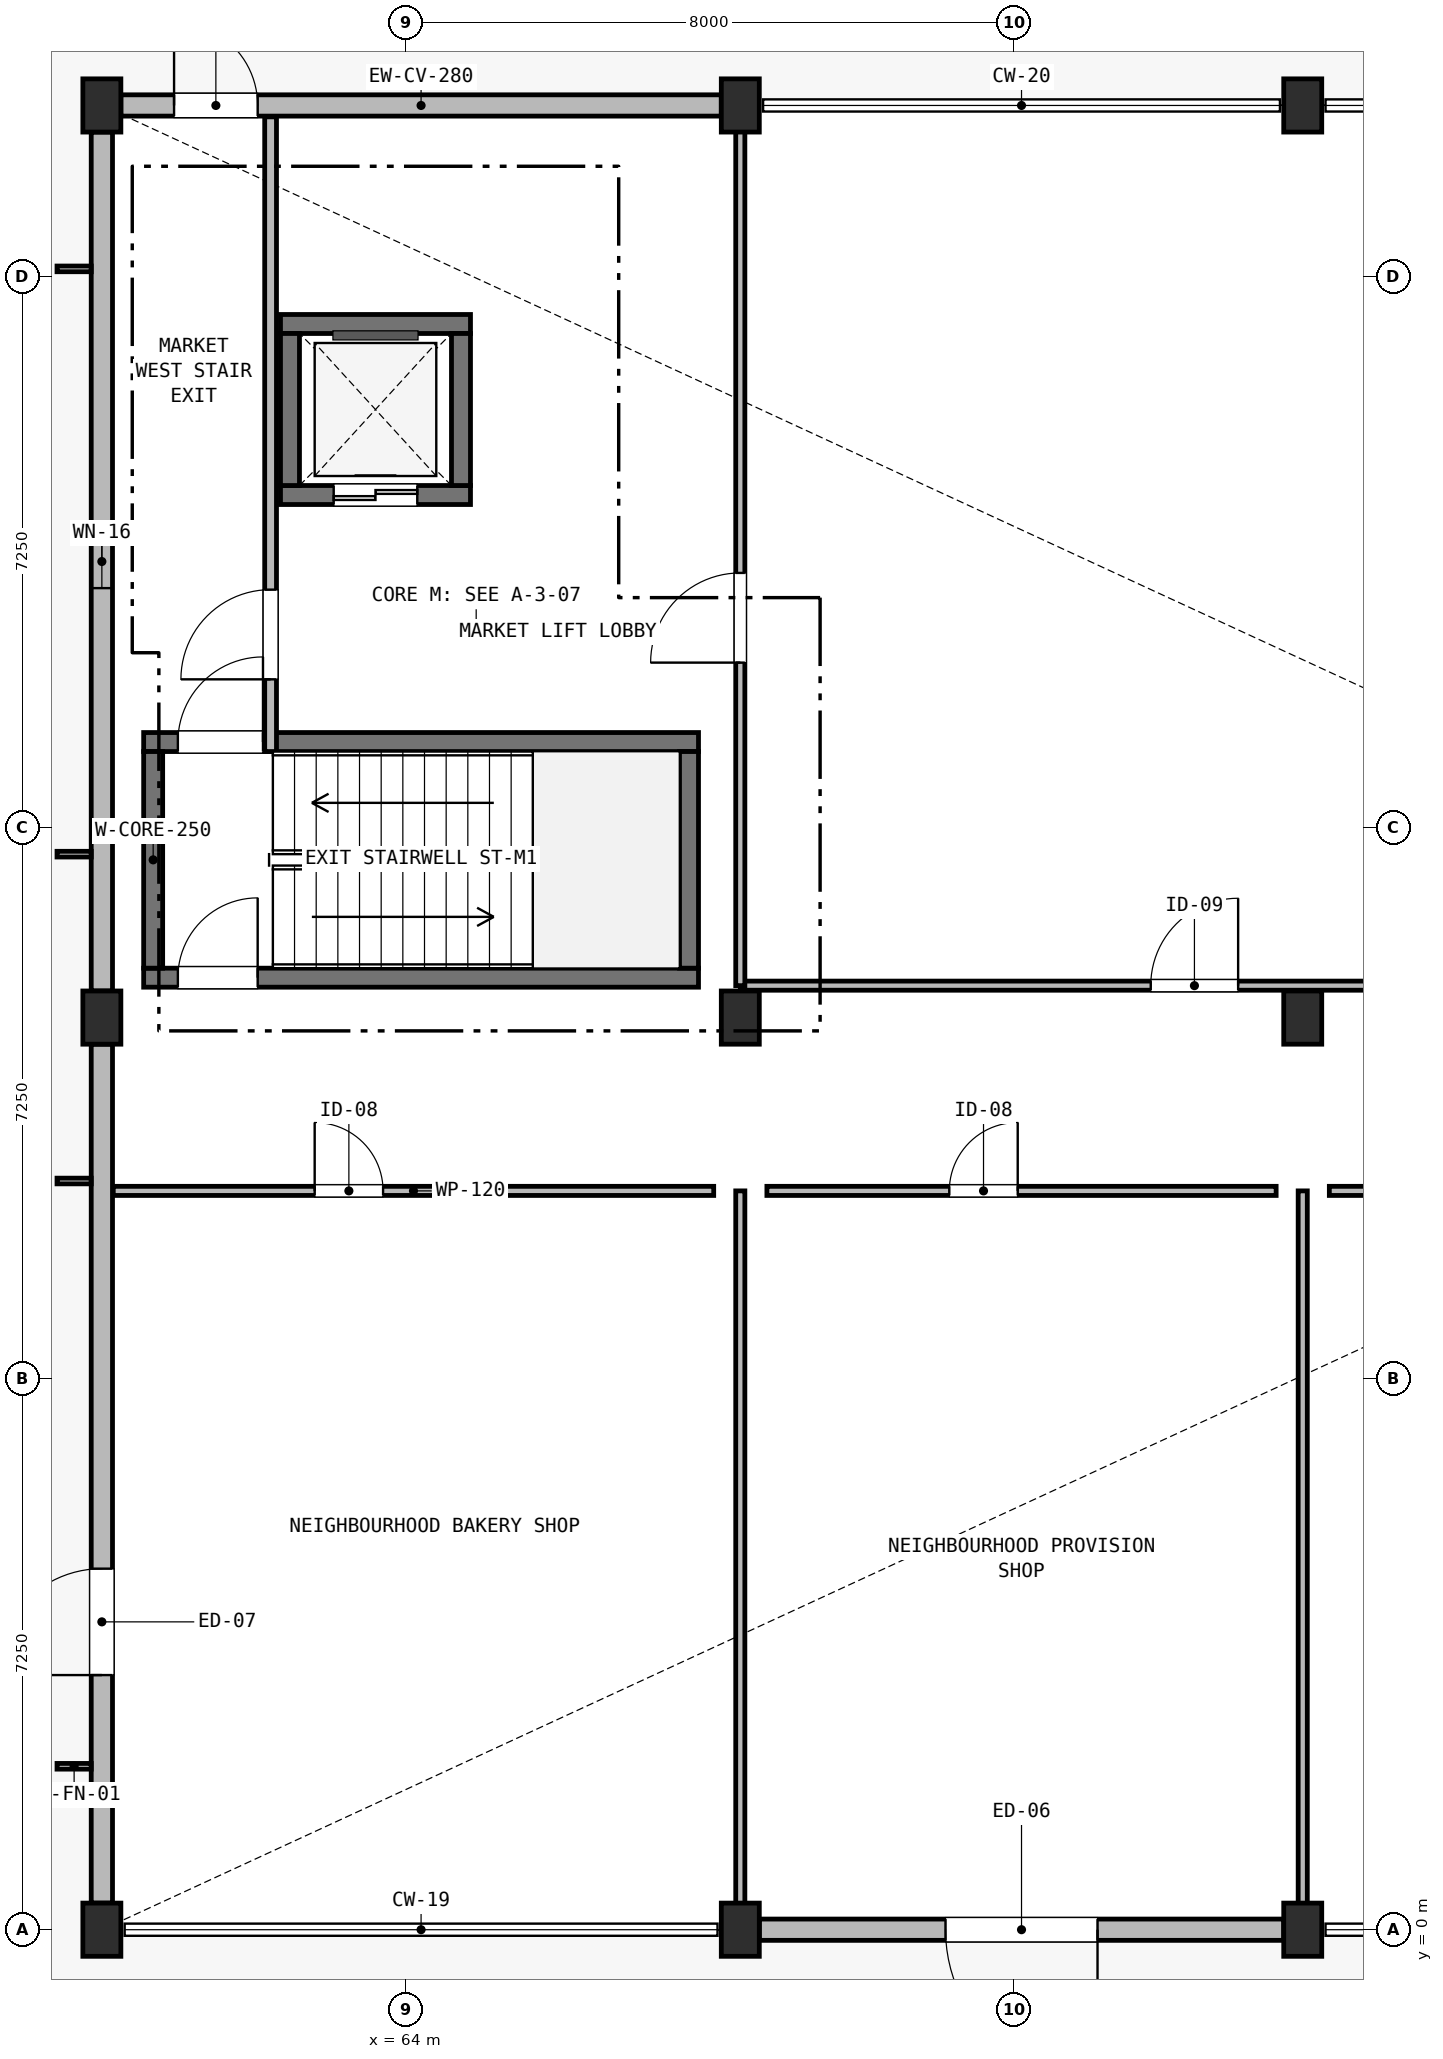
"""IFC4 building model, lengths in metres.
Left out: names, types, materials, properties, quantities, classifications, styles, units other than length and angle.
Written with IfcOpenShell. Run it as: python <this file> out.ifc"""

import sys

from ifc_helpers import new_model, si_unit, direction, frame, frame_2d, origin, origin_2d, place, context, subcontext, project, spatial, rectangle, extrude, element, fill, save


model = new_model("IFC4")
c1 = context("Model", 3, precision=1e-05, world=origin(), true_north=direction((0.0, 1.0)))
c2 = subcontext(c1, "Body", "Model", "MODEL_VIEW")
j1 = project(units=[si_unit("LENGTHUNIT", "METRE"), si_unit("PLANEANGLEUNIT", "RADIAN")], contexts=[c1])
p1 = place(None, origin())
s1 = spatial("IfcSite", under=j1, at=p1, CompositionType="ELEMENT")
p2 = place(p1, origin())
s2 = spatial("IfcBuilding", under=s1, at=p2, CompositionType="ELEMENT")
p3 = place(p2, origin())
s3 = spatial("IfcBuildingStorey", under=s2, at=p3, CompositionType="ELEMENT", Elevation=0.0)
p4 = place(p3, frame((60.55, 12.525, 0.0), z_axis=(0.0, 0.0, 1.0), x_axis=(1.0, 0.0, 0.0)))
e1 = element("IfcWall", 1, at=p4, inside=s3, PredefinedType="SHEAR", context=c2, shape_type="SweptSolid", body=[
    extrude(rectangle(XDim=7.3, YDim=0.25, at=frame_2d((3.65, 0.0))), origin(), (0.0, 0.0, 1.0), 4.5),
])
p5 = place(p4, frame((0.45, 0.0, 0.0)))
e2 = element("IfcOpeningElement", 2, at=p5, cuts=e1, PredefinedType="OPENING", context=c2, shape_type="SweptSolid", body=[
    extrude(rectangle(XDim=1.05, YDim=2.15, at=frame_2d((0.525, 1.075))), frame((0.0, 0.14, 0.0), z_axis=(0.0, -1.0, 0.0), x_axis=(1.0, 0.0, 0.0)), (0.0, 0.0, 1.0), 0.28),
])
p6 = place(p3, frame((60.55, 15.625, 0.0), z_axis=(0.0, 0.0, 1.0), x_axis=(1.0, 0.0, 0.0)))
e3 = element("IfcWall", 3, at=p6, inside=s3, PredefinedType="SHEAR", context=c2, shape_type="SweptSolid", body=[
    extrude(rectangle(XDim=7.3, YDim=0.25, at=frame_2d((3.65, 0.0))), origin(), (0.0, 0.0, 1.0), 4.5),
])
p7 = place(p6, frame((0.45, 0.0, 0.0)))
e4 = element("IfcOpeningElement", 4, at=p7, cuts=e3, PredefinedType="OPENING", context=c2, shape_type="SweptSolid", body=[
    extrude(rectangle(XDim=1.12, YDim=2.15, at=frame_2d((0.56, 1.075))), frame((0.0, 0.14, 0.0), z_axis=(0.0, -1.0, 0.0), x_axis=(1.0, 0.0, 0.0)), (0.0, 0.0, 1.0), 0.28),
])
for number, where, z_axis, x_axis in (
    (5, (60.675, 12.65, 0.0), (0.0, 0.0, 1.0), (0.0, 1.0, 0.0)),
    (6, (67.725, 12.65, 0.0), (0.0, 0.0, 1.0), (0.0, 1.0, 0.0)),
):
    element("IfcWall", number, at=place(p3, frame(where, z_axis=z_axis, x_axis=x_axis)), inside=s3, PredefinedType="SHEAR", context=c2, shape_type="SweptSolid", body=[
        extrude(rectangle(XDim=2.85, YDim=0.25, at=frame_2d((1.425, 0.0))), origin(), (0.0, 0.0, 1.0), 4.5),
    ])
p8 = place(p3, frame((62.35, 21.125, 0.0), z_axis=(0.0, 0.0, 1.0), x_axis=(1.0, 0.0, 0.0)))
e7 = element("IfcWall", 7, at=p8, inside=s3, PredefinedType="SHEAR", context=c2, shape_type="SweptSolid", body=[
    extrude(rectangle(XDim=2.5, YDim=0.25, at=frame_2d((1.25, 0.0))), origin(), (0.0, 0.0, 1.0), 4.5),
])
p9 = place(p3, frame((62.35, 18.875, 0.0), z_axis=(0.0, 0.0, 1.0), x_axis=(1.0, 0.0, 0.0)))
e8 = element("IfcWall", 8, at=p9, inside=s3, PredefinedType="SHEAR", context=c2, shape_type="SweptSolid", body=[
    extrude(rectangle(XDim=2.5, YDim=0.25, at=frame_2d((1.25, 0.0))), origin(), (0.0, 0.0, 1.0), 4.5),
])
p10 = place(p9, frame((0.7, 0.0, 0.0)))
e9 = element("IfcOpeningElement", 9, at=p10, cuts=e8, PredefinedType="OPENING", context=c2, shape_type="SweptSolid", body=[
    extrude(rectangle(XDim=1.1, YDim=2.15, at=frame_2d((0.55, 1.075))), frame((0.0, 0.14, 0.0), z_axis=(0.0, -1.0, 0.0), x_axis=(1.0, 0.0, 0.0)), (0.0, 0.0, 1.0), 0.28),
])
for number, where, z_axis, x_axis in (
    (10, (62.475, 19.0, 0.0), (0.0, 0.0, 1.0), (0.0, 1.0, 0.0)),
    (11, (64.725, 19.0, 0.0), (0.0, 0.0, 1.0), (0.0, 1.0, 0.0)),
):
    element("IfcWall", number, at=place(p3, frame(where, z_axis=z_axis, x_axis=x_axis)), inside=s3, PredefinedType="SHEAR", context=c2, shape_type="SweptSolid", body=[
        extrude(rectangle(XDim=2.0, YDim=0.25, at=frame_2d((1.0, 0.0))), origin(), (0.0, 0.0, 1.0), 4.5),
    ])
for number, where, z_axis, x_axis in (
    (12, (60.0, 0.0, 0.0), (0.0, 0.0, 1.0), (1.0, 0.0, 0.0)),
    (13, (60.0, 12.0, 0.0), (0.0, 0.0, 1.0), (1.0, 0.0, 0.0)),
    (14, (60.0, 24.0, 0.0), (0.0, 0.0, 1.0), (1.0, 0.0, 0.0)),
    (15, (68.4, 0.0, 0.0), (0.0, 0.0, 1.0), (1.0, 0.0, 0.0)),
    (16, (68.4, 12.0, 0.0), (0.0, 0.0, 1.0), (1.0, 0.0, 0.0)),
    (17, (68.4, 24.0, 0.0), (0.0, 0.0, 1.0), (1.0, 0.0, 0.0)),
    (18, (75.8, 0.0, 0.0), (0.0, 0.0, 1.0), (1.0, 0.0, 0.0)),
    (19, (75.8, 12.0, 0.0), (0.0, 0.0, 1.0), (1.0, 0.0, 0.0)),
    (20, (75.8, 24.0, 0.0), (0.0, 0.0, 1.0), (1.0, 0.0, 0.0)),
):
    element("IfcColumn", number, at=place(p3, frame(where, z_axis=z_axis, x_axis=x_axis)), inside=s3, PredefinedType="COLUMN", context=c2, shape_type="SweptSolid", body=[
        extrude(rectangle(XDim=0.5, YDim=0.7, at=origin_2d()), origin(), (0.0, 0.0, 1.0), 4.5),
    ])
p11 = place(p3, frame((60.25, 24.0, 0.0), z_axis=(0.0, 0.0, 1.0), x_axis=(1.0, 0.0, 0.0)))
e21 = element("IfcWall", 21, at=p11, inside=s3, PredefinedType="SOLIDWALL", context=c2, shape_type="SweptSolid", body=[
    extrude(rectangle(XDim=7.9, YDim=0.28, at=frame_2d((3.95, 0.0))), origin(), (0.0, 0.0, 1.0), 3.59),
])
p12 = place(p11, frame((0.7, 0.0, 0.0)))
e22 = element("IfcOpeningElement", 22, at=p12, cuts=e21, PredefinedType="OPENING", context=c2, shape_type="SweptSolid", body=[
    extrude(rectangle(XDim=1.1, YDim=2.15, at=frame_2d((0.55, 1.075))), frame((0.0, 0.155, 0.0), z_axis=(0.0, -1.0, 0.0), x_axis=(1.0, 0.0, 0.0)), (0.0, 0.0, 1.0), 0.31),
])
p13 = place(p3, frame((75.55, 0.0, 0.0), z_axis=(0.0, 0.0, 1.0), x_axis=(-1.0, 0.0, 0.0)))
e23 = element("IfcWall", 23, at=p13, inside=s3, PredefinedType="SOLIDWALL", context=c2, shape_type="SweptSolid", body=[
    extrude(rectangle(XDim=6.9, YDim=0.28, at=frame_2d((3.45, 0.0))), origin(), (0.0, 0.0, 1.0), 3.59),
])
p14 = place(p13, frame((2.45, 0.0, 0.0)))
e24 = element("IfcOpeningElement", 24, at=p14, cuts=e23, PredefinedType="OPENING", context=c2, shape_type="SweptSolid", body=[
    extrude(rectangle(XDim=2.0, YDim=2.45, at=frame_2d((1.0, 1.225))), frame((0.0, 0.155, 0.0), z_axis=(0.0, -1.0, 0.0), x_axis=(1.0, 0.0, 0.0)), (0.0, 0.0, 1.0), 0.31),
])
p15 = place(p3, frame((60.0, 0.35, 0.0), z_axis=(0.0, 0.0, 1.0), x_axis=(0.0, 1.0, 0.0)))
e25 = element("IfcWall", 25, at=p15, inside=s3, PredefinedType="SOLIDWALL", context=c2, shape_type="SweptSolid", body=[
    extrude(rectangle(XDim=11.3, YDim=0.28, at=frame_2d((5.65, 0.0))), origin(), (0.0, 0.0, 1.0), 3.59),
])
p16 = place(p15, frame((3.0, 0.0, 0.0)))
e26 = element("IfcOpeningElement", 26, at=p16, cuts=e25, PredefinedType="OPENING", context=c2, shape_type="SweptSolid", body=[
    extrude(rectangle(XDim=1.4, YDim=2.2, at=frame_2d((0.7, 1.1))), frame((0.0, 0.155, 0.0), z_axis=(0.0, -1.0, 0.0), x_axis=(1.0, 0.0, 0.0)), (0.0, 0.0, 1.0), 0.31),
])
p17 = place(p3, frame((60.0, 12.35, 0.0), z_axis=(0.0, 0.0, 1.0), x_axis=(0.0, 1.0, 0.0)))
e27 = element("IfcWall", 27, at=p17, inside=s3, PredefinedType="SOLIDWALL", context=c2, shape_type="SweptSolid", body=[
    extrude(rectangle(XDim=11.3, YDim=0.28, at=frame_2d((5.65, 0.0))), origin(), (0.0, 0.0, 1.0), 3.59),
])
p18 = place(p17, frame((5.3, 0.0, 0.42)))
e28 = element("IfcOpeningElement", 28, at=p18, cuts=e27, PredefinedType="OPENING", context=c2, shape_type="SweptSolid", body=[
    extrude(rectangle(XDim=0.7, YDim=2.14, at=frame_2d((0.35, 1.07))), frame((0.0, 0.155, 0.0), z_axis=(0.0, -1.0, 0.0), x_axis=(1.0, 0.0, 0.0)), (0.0, 0.0, 1.0), 0.31),
])
p19 = place(p3, frame((60.15, 9.72, 0.0), z_axis=(0.0, 0.0, 1.0), x_axis=(1.0, 0.0, 0.0)))
e29 = element("IfcWall", 29, at=p19, inside=s3, PredefinedType="PARTITIONING", context=c2, shape_type="SweptSolid", body=[
    extrude(rectangle(XDim=7.9, YDim=0.12, at=frame_2d((3.95, 0.0))), origin(), (0.0, 0.0, 1.0), 4.23),
])
p20 = place(p19, frame((2.65, 0.0, 0.0)))
e30 = element("IfcOpeningElement", 30, at=p20, cuts=e29, PredefinedType="OPENING", context=c2, shape_type="SweptSolid", body=[
    extrude(rectangle(XDim=0.9, YDim=2.1, at=frame_2d((0.45, 1.05))), frame((0.0, 0.075, 0.0), z_axis=(0.0, -1.0, 0.0), x_axis=(1.0, 0.0, 0.0)), (0.0, 0.0, 1.0), 0.15),
])
p21 = place(p3, frame((68.75, 9.72, 0.0), z_axis=(0.0, 0.0, 1.0), x_axis=(1.0, 0.0, 0.0)))
e31 = element("IfcWall", 31, at=p21, inside=s3, PredefinedType="PARTITIONING", context=c2, shape_type="SweptSolid", body=[
    extrude(rectangle(XDim=6.7, YDim=0.12, at=frame_2d((3.35, 0.0))), origin(), (0.0, 0.0, 1.0), 4.23),
])
p22 = place(p21, frame((2.4, 0.0, 0.0)))
e32 = element("IfcOpeningElement", 32, at=p22, cuts=e31, PredefinedType="OPENING", context=c2, shape_type="SweptSolid", body=[
    extrude(rectangle(XDim=0.9, YDim=2.1, at=frame_2d((0.45, 1.05))), frame((0.0, 0.075, 0.0), z_axis=(0.0, -1.0, 0.0), x_axis=(1.0, 0.0, 0.0)), (0.0, 0.0, 1.0), 0.15),
])
p23 = place(p3, frame((76.15, 9.72, 0.0), z_axis=(0.0, 0.0, 1.0), x_axis=(1.0, 0.0, 0.0)))
e33 = element("IfcWall", 33, at=p23, inside=s3, PredefinedType="PARTITIONING", context=c2, shape_type="SweptSolid", body=[
    extrude(rectangle(XDim=8.5, YDim=0.12, at=frame_2d((4.25, 0.0))), origin(), (0.0, 0.0, 1.0), 4.23),
])
p24 = place(p23, frame((2.4, 0.0, 0.0)))
e34 = element("IfcOpeningElement", 34, at=p24, cuts=e33, PredefinedType="OPENING", context=c2, shape_type="SweptSolid", body=[
    extrude(rectangle(XDim=0.88, YDim=2.1, at=frame_2d((0.44, 1.05))), frame((0.0, 0.075, 0.0), z_axis=(0.0, -1.0, 0.0), x_axis=(1.0, 0.0, 0.0)), (0.0, 0.0, 1.0), 0.15),
])
for number, where, z_axis, x_axis in (
    (35, (68.4, 0.12, 0.0), (0.0, 0.0, 1.0), (0.0, 1.0, 0.0)),
    (36, (75.8, 0.12, 0.0), (0.0, 0.0, 1.0), (0.0, 1.0, 0.0)),
):
    element("IfcWall", number, at=place(p3, frame(where, z_axis=z_axis, x_axis=x_axis)), inside=s3, PredefinedType="PARTITIONING", context=c2, shape_type="SweptSolid", body=[
        extrude(rectangle(XDim=9.6, YDim=0.12, at=frame_2d((4.8, 0.0))), origin(), (0.0, 0.0, 1.0), 3.6),
    ])
p25 = place(p3, frame((68.4, 12.42, 0.0), z_axis=(0.0, 0.0, 1.0), x_axis=(1.0, 0.0, 0.0)))
e37 = element("IfcWall", 37, at=p25, inside=s3, PredefinedType="PARTITIONING", context=c2, shape_type="SweptSolid", body=[
    extrude(rectangle(XDim=16.25, YDim=0.12, at=frame_2d((8.125, 0.0))), origin(), (0.0, 0.0, 1.0), 4.23),
])
p26 = place(p25, frame((5.4, 0.0, 0.0)))
e38 = element("IfcOpeningElement", 38, at=p26, cuts=e37, PredefinedType="OPENING", context=c2, shape_type="SweptSolid", body=[
    extrude(rectangle(XDim=1.15, YDim=2.15, at=frame_2d((0.575, 1.075))), frame((0.0, 0.075, 0.0), z_axis=(0.0, -1.0, 0.0), x_axis=(1.0, 0.0, 0.0)), (0.0, 0.0, 1.0), 0.15),
])
p27 = place(p3, frame((62.22, 15.5, 0.0), z_axis=(0.0, 0.0, 1.0), x_axis=(0.0, 1.0, 0.0)))
e39 = element("IfcWall", 39, at=p27, inside=s3, PredefinedType="PARTITIONING", context=c2, shape_type="SweptSolid", body=[
    extrude(rectangle(XDim=8.35, YDim=0.155, at=frame_2d((4.175, 0.0))), origin(), (0.0, 0.0, 1.0), 4.23),
])
p28 = place(p27, frame((0.95, 0.0, 0.0)))
e40 = element("IfcOpeningElement", 40, at=p28, cuts=e39, PredefinedType="OPENING", context=c2, shape_type="SweptSolid", body=[
    extrude(rectangle(XDim=1.18, YDim=2.15, at=frame_2d((0.59, 1.075))), frame((0.0, 0.093, 0.0), z_axis=(0.0, -1.0, 0.0), x_axis=(1.0, 0.0, 0.0)), (0.0, 0.0, 1.0), 0.185),
])
p29 = place(p3, frame((68.4, 12.42, 0.0), z_axis=(0.0, 0.0, 1.0), x_axis=(0.0, 1.0, 0.0)))
e41 = element("IfcWall", 41, at=p29, inside=s3, PredefinedType="PARTITIONING", context=c2, shape_type="SweptSolid", body=[
    extrude(rectangle(XDim=11.54, YDim=0.12, at=frame_2d((5.77, 0.0))), origin(), (0.0, 0.0, 1.0), 3.6),
])
p30 = place(p29, frame((4.25, 0.0, 0.0)))
e42 = element("IfcOpeningElement", 42, at=p30, cuts=e41, PredefinedType="OPENING", context=c2, shape_type="SweptSolid", body=[
    extrude(rectangle(XDim=1.18, YDim=2.15, at=frame_2d((0.59, 1.075))), frame((0.0, 0.075, 0.0), z_axis=(0.0, -1.0, 0.0), x_axis=(1.0, 0.0, 0.0)), (0.0, 0.0, 1.0), 0.15),
])
p31 = place(p12, origin())
e43 = element("IfcDoor", 43, at=p31, inside=s3, OperationType="SINGLE_SWING_LEFT", PredefinedType="DOOR", context=c2, shape_type="SweptSolid", body=[
    extrude(rectangle(XDim=1.1, YDim=2.15, at=frame_2d((0.55, 1.075))), frame((0.0, 0.025, 0.0), z_axis=(0.0, -1.0, 0.0), x_axis=(1.0, 0.0, 0.0)), (0.0, 0.0, 1.0), 0.05),
])
fill(e22, e43)
p32 = place(p14, origin())
e44 = element("IfcDoor", 44, at=p32, inside=s3, OperationType="DOUBLE_DOOR_SINGLE_SWING", PredefinedType="DOOR", context=c2, shape_type="SweptSolid", body=[
    extrude(rectangle(XDim=2.0, YDim=2.45, at=frame_2d((1.0, 1.225))), frame((0.0, 0.025, 0.0), z_axis=(0.0, -1.0, 0.0), x_axis=(1.0, 0.0, 0.0)), (0.0, 0.0, 1.0), 0.05),
])
fill(e24, e44)
p33 = place(p16, origin())
e45 = element("IfcDoor", 45, at=p33, inside=s3, OperationType="DOUBLE_DOOR_SINGLE_SWING", PredefinedType="DOOR", context=c2, shape_type="SweptSolid", body=[
    extrude(rectangle(XDim=1.4, YDim=2.2, at=frame_2d((0.7, 1.1))), frame((0.0, 0.025, 0.0), z_axis=(0.0, -1.0, 0.0), x_axis=(1.0, 0.0, 0.0)), (0.0, 0.0, 1.0), 0.05),
])
fill(e26, e45)
p34 = place(p18, origin())
e46 = element("IfcWindow", 46, at=p34, inside=s3, PartitioningType="SINGLE_PANEL", PredefinedType="WINDOW", context=c2, shape_type="SweptSolid", body=[
    extrude(rectangle(XDim=0.7, YDim=2.14, at=frame_2d((0.35, 1.07))), frame((0.0, 0.03, 0.0), z_axis=(0.0, -1.0, 0.0), x_axis=(1.0, 0.0, 0.0)), (0.0, 0.0, 1.0), 0.06),
])
fill(e28, e46)
p35 = place(p20, origin())
e47 = element("IfcDoor", 47, at=p35, inside=s3, OperationType="SINGLE_SWING_LEFT", PredefinedType="DOOR", context=c2, shape_type="SweptSolid", body=[
    extrude(rectangle(XDim=0.9, YDim=2.1, at=frame_2d((0.45, 1.05))), frame((0.0, 0.025, 0.0), z_axis=(0.0, -1.0, 0.0), x_axis=(1.0, 0.0, 0.0)), (0.0, 0.0, 1.0), 0.05),
])
fill(e30, e47)
p36 = place(p22, origin())
e48 = element("IfcDoor", 48, at=p36, inside=s3, OperationType="SINGLE_SWING_RIGHT", PredefinedType="DOOR", context=c2, shape_type="SweptSolid", body=[
    extrude(rectangle(XDim=0.9, YDim=2.1, at=frame_2d((0.45, 1.05))), frame((0.0, 0.025, 0.0), z_axis=(0.0, -1.0, 0.0), x_axis=(1.0, 0.0, 0.0)), (0.0, 0.0, 1.0), 0.05),
])
fill(e32, e48)
p37 = place(p26, origin())
e49 = element("IfcDoor", 49, at=p37, inside=s3, OperationType="SINGLE_SWING_RIGHT", PredefinedType="DOOR", context=c2, shape_type="SweptSolid", body=[
    extrude(rectangle(XDim=1.15, YDim=2.15, at=frame_2d((0.575, 1.075))), frame((0.0, 0.025, 0.0), z_axis=(0.0, -1.0, 0.0), x_axis=(1.0, 0.0, 0.0)), (0.0, 0.0, 1.0), 0.05),
])
fill(e38, e49)
p38 = place(p28, origin())
e50 = element("IfcDoor", 50, at=p38, inside=s3, OperationType="SINGLE_SWING_LEFT", PredefinedType="DOOR", context=c2, shape_type="SweptSolid", body=[
    extrude(rectangle(XDim=1.18, YDim=2.15, at=frame_2d((0.59, 1.075))), frame((0.0, 0.025, 0.0), z_axis=(0.0, -1.0, 0.0), x_axis=(1.0, 0.0, 0.0)), (0.0, 0.0, 1.0), 0.05),
])
fill(e40, e50)
p39 = place(p30, origin())
e51 = element("IfcDoor", 51, at=p39, inside=s3, OperationType="SINGLE_SWING_LEFT", PredefinedType="DOOR", context=c2, shape_type="SweptSolid", body=[
    extrude(rectangle(XDim=1.18, YDim=2.15, at=frame_2d((0.59, 1.075))), frame((0.0, 0.025, 0.0), z_axis=(0.0, -1.0, 0.0), x_axis=(1.0, 0.0, 0.0)), (0.0, 0.0, 1.0), 0.05),
])
fill(e42, e51)
p40 = place(p5, origin())
e52 = element("IfcDoor", 52, at=p40, inside=s3, OperationType="SINGLE_SWING_RIGHT", PredefinedType="DOOR", context=c2, shape_type="SweptSolid", body=[
    extrude(rectangle(XDim=1.05, YDim=2.15, at=frame_2d((0.525, 1.075))), frame((0.0, 0.025, 0.0), z_axis=(0.0, -1.0, 0.0), x_axis=(1.0, 0.0, 0.0)), (0.0, 0.0, 1.0), 0.05),
])
fill(e2, e52)
p41 = place(p7, origin())
e53 = element("IfcDoor", 53, at=p41, inside=s3, OperationType="SINGLE_SWING_RIGHT", PredefinedType="DOOR", context=c2, shape_type="SweptSolid", body=[
    extrude(rectangle(XDim=1.12, YDim=2.15, at=frame_2d((0.56, 1.075))), frame((0.0, 0.025, 0.0), z_axis=(0.0, -1.0, 0.0), x_axis=(1.0, 0.0, 0.0)), (0.0, 0.0, 1.0), 0.05),
])
fill(e4, e53)
p42 = place(p10, origin())
e54 = element("IfcDoor", 54, at=p42, inside=s3, OperationType="DOUBLE_DOOR_SLIDING", PredefinedType="DOOR", context=c2, shape_type="SweptSolid", body=[
    extrude(rectangle(XDim=1.1, YDim=2.15, at=frame_2d((0.55, 1.075))), frame((0.0, 0.025, 0.0), z_axis=(0.0, -1.0, 0.0), x_axis=(1.0, 0.0, 0.0)), (0.0, 0.0, 1.0), 0.05),
])
fill(e9, e54)
save(model, sys.argv[1])
